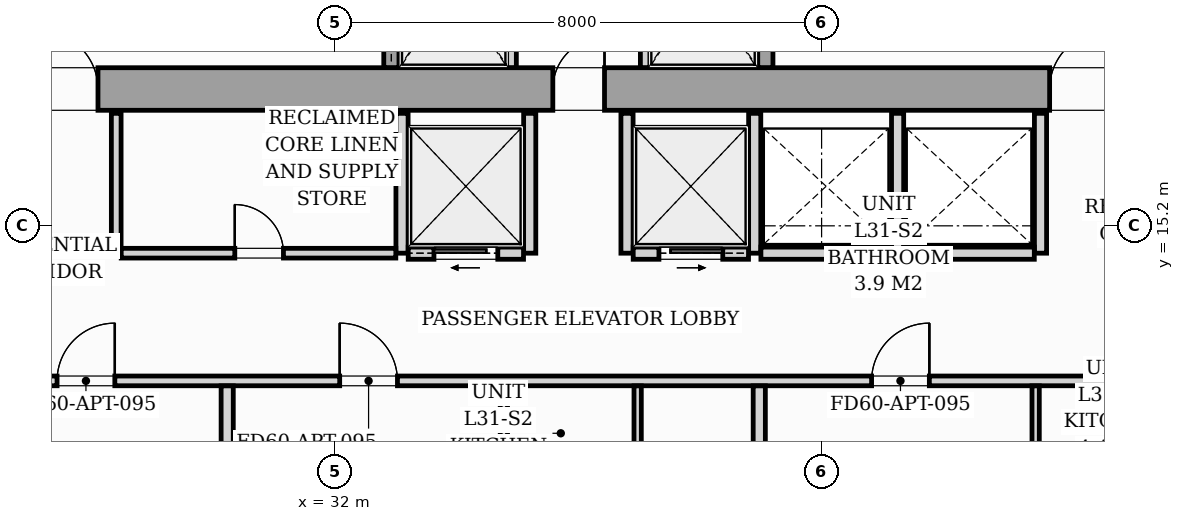
"""IFC4 building model, lengths in metres.
Left out: names, types, materials, properties, quantities, classifications, styles, units other than length and angle.
Written with IfcOpenShell. Run it as: python <this file> out.ifc"""

import sys

from ifc_helpers import new_model, si_unit, direction, frame, frame_2d, origin, origin_2d, place, context, subcontext, project, spatial, rectangle, i_section, extrude, source, transform, mapped, element, fill, save


model = new_model("IFC4")
c1 = context("Model", 3, precision=1e-05, world=origin(), true_north=direction((0.0, 1.0)))
c2 = subcontext(c1, "Body", "Model", "MODEL_VIEW")
j1 = project(units=[si_unit("LENGTHUNIT", "METRE"), si_unit("PLANEANGLEUNIT", "RADIAN")], contexts=[c1])
p1 = place(None, origin())
s1 = spatial("IfcSite", under=j1, at=p1, CompositionType="ELEMENT")
p2 = place(p1, origin())
s2 = spatial("IfcBuilding", under=s1, at=p2, CompositionType="ELEMENT")
p3 = place(p2, frame((0.0, 0.0, 109.8)))
s3 = spatial("IfcBuildingStorey", under=s2, at=p3, CompositionType="ELEMENT", Elevation=109.8)
m1 = source(origin(), c2, "Body", "SweptSolid", [
    extrude(i_section(OverallWidth=0.427, OverallDepth=0.483, WebThickness=0.051, FlangeThickness=0.082, FilletRadius=0.018, at=origin_2d()), origin(), (0.0, 0.0, 1.0), 3.196),
])
for number, where, z_axis, x_axis in (
    (1, (33.12, 17.4, 0.002), (0.0, 0.0, 1.0), (1.0, 0.0, 0.0)),
    (2, (38.88, 17.4, 0.002), (0.0, 0.0, 1.0), (1.0, 0.0, 0.0)),
):
    element("IfcColumn", number, at=place(p3, frame(where, z_axis=z_axis, x_axis=x_axis)), inside=s3, PredefinedType="PILASTER", context=c2, shape_type="MappedRepresentation", body=[
        mapped(m1, transform((0.0, 0.0, 0.0), scale=1.0)),
    ])
p4 = place(p3, frame((26.1, 17.45, 0.0), z_axis=(0.0, 0.0, 1.0), x_axis=(1.0, 0.0, 0.0)))
e3 = element("IfcWall", 3, at=p4, inside=s3, PredefinedType="SHEAR", context=c2, shape_type="SweptSolid", body=[
    extrude(rectangle(XDim=19.8, YDim=0.7, at=frame_2d((9.9, 0.0))), origin(), (0.0, 0.0, 1.0), 3.2),
])
p5 = place(p4, frame((1.05, 0.0, 0.0)))
e4 = element("IfcOpeningElement", 4, at=p5, cuts=e3, PredefinedType="OPENING", context=c2, shape_type="SweptSolid", body=[
    extrude(rectangle(XDim=0.95, YDim=2.06, at=frame_2d((0.475, 1.03))), frame((0.0, 0.36, 0.0), z_axis=(0.0, -1.0, 0.0), x_axis=(1.0, 0.0, 0.0)), (0.0, 0.0, 1.0), 0.72),
])
p6 = place(p4, frame((9.48, 0.0, 0.0)))
e5 = element("IfcOpeningElement", 5, at=p6, cuts=e3, PredefinedType="OPENING", context=c2, shape_type="SweptSolid", body=[
    extrude(rectangle(XDim=0.85, YDim=2.0, at=frame_2d((0.425, 1.0))), frame((0.0, 0.36, 0.0), z_axis=(0.0, -1.0, 0.0), x_axis=(1.0, 0.0, 0.0)), (0.0, 0.0, 1.0), 0.72),
])
p7 = place(p4, frame((17.65, 0.0, 0.0)))
e6 = element("IfcOpeningElement", 6, at=p7, cuts=e3, PredefinedType="OPENING", context=c2, shape_type="SweptSolid", body=[
    extrude(rectangle(XDim=0.95, YDim=2.06, at=frame_2d((0.475, 1.03))), frame((0.0, 0.36, 0.0), z_axis=(0.0, -1.0, 0.0), x_axis=(1.0, 0.0, 0.0)), (0.0, 0.0, 1.0), 0.72),
])
p8 = place(p3, frame((32.925, 17.802, 0.0), z_axis=(0.0, 0.0, 1.0), x_axis=(0.0, 1.0, 0.0)))
e7 = element("IfcWall", 7, at=p8, inside=s3, PredefinedType="SOLIDWALL", context=c2, shape_type="SweptSolid", body=[
    extrude(rectangle(XDim=2.646, YDim=0.25, at=frame_2d((1.323, 0.0))), origin(), (0.0, 0.0, 1.0), 3.2),
])
p9 = place(p8, frame((0.598, 0.0, 0.0)))
e8 = element("IfcOpeningElement", 8, at=p9, cuts=e7, PredefinedType="OPENING", context=c2, shape_type="SweptSolid", body=[
    extrude(rectangle(XDim=1.1, YDim=2.08, at=frame_2d((0.55, 1.04))), frame((0.0, 0.135, 0.0), z_axis=(0.0, -1.0, 0.0), x_axis=(1.0, 0.0, 0.0)), (0.0, 0.0, 1.0), 0.27),
])
for number, where, z_axis, x_axis in (
    (9, (34.9, 17.802, 0.0), (0.0, 0.0, 1.0), (0.0, 1.0, 0.0)),
    (10, (37.1, 17.802, 0.0), (0.0, 0.0, 1.0), (0.0, 1.0, 0.0)),
):
    element("IfcWall", number, at=place(p3, frame(where, z_axis=z_axis, x_axis=x_axis)), inside=s3, PredefinedType="PARTITIONING", context=c2, shape_type="SweptSolid", body=[
        extrude(rectangle(XDim=2.646, YDim=0.16, at=frame_2d((1.323, 0.0))), origin(), (0.0, 0.0, 1.0), 2.94),
    ])
p10 = place(p3, frame((39.075, 17.802, 0.0), z_axis=(0.0, 0.0, 1.0), x_axis=(0.0, 1.0, 0.0)))
e11 = element("IfcWall", 11, at=p10, inside=s3, PredefinedType="SOLIDWALL", context=c2, shape_type="SweptSolid", body=[
    extrude(rectangle(XDim=2.646, YDim=0.25, at=frame_2d((1.323, 0.0))), origin(), (0.0, 0.0, 1.0), 3.2),
])
p11 = place(p10, frame((0.598, 0.0, 0.0)))
e12 = element("IfcOpeningElement", 12, at=p11, cuts=e11, PredefinedType="OPENING", context=c2, shape_type="SweptSolid", body=[
    extrude(rectangle(XDim=1.1, YDim=2.08, at=frame_2d((0.55, 1.04))), frame((0.0, 0.135, 0.0), z_axis=(0.0, -1.0, 0.0), x_axis=(1.0, 0.0, 0.0)), (0.0, 0.0, 1.0), 0.27),
])
p12 = place(p3, frame((28.4, 14.75, 0.0), z_axis=(0.0, 0.0, 1.0), x_axis=(0.0, 1.0, 0.0)))
e13 = element("IfcWall", 13, at=p12, inside=s3, PredefinedType="PARTITIONING", context=c2, shape_type="SweptSolid", body=[
    extrude(rectangle(XDim=2.3, YDim=0.16, at=frame_2d((1.15, 0.0))), origin(), (0.0, 0.0, 1.0), 2.94),
])
p13 = place(p3, frame((33.1, 14.75, 0.0), z_axis=(0.0, 0.0, 1.0), x_axis=(0.0, 1.0, 0.0)))
e14 = element("IfcWall", 14, at=p13, inside=s3, PredefinedType="PARTITIONING", context=c2, shape_type="SweptSolid", body=[
    extrude(rectangle(XDim=2.3, YDim=0.2, at=frame_2d((1.15, 0.0))), origin(), (0.0, 0.0, 1.0), 2.94),
])
p14 = place(p3, frame((28.482, 14.75, 0.0), z_axis=(0.0, 0.0, 1.0), x_axis=(1.0, 0.0, 0.0)))
e15 = element("IfcWall", 15, at=p14, inside=s3, PredefinedType="PARTITIONING", context=c2, shape_type="SweptSolid", body=[
    extrude(rectangle(XDim=4.516, YDim=0.16, at=frame_2d((2.258, 0.0))), origin(), (0.0, 0.0, 1.0), 2.94),
])
p15 = place(p14, frame((1.868, 0.0, 0.0)))
e16 = element("IfcOpeningElement", 16, at=p15, cuts=e15, PredefinedType="OPENING", context=c2, shape_type="SweptSolid", body=[
    extrude(rectangle(XDim=0.8, YDim=2.05, at=frame_2d((0.4, 1.025))), frame((0.0, 0.09, 0.0), z_axis=(0.0, -1.0, 0.0), x_axis=(1.0, 0.0, 0.0)), (0.0, 0.0, 1.0), 0.18),
])
p16 = place(p3, frame((35.2, 14.75, 0.0), z_axis=(0.0, 0.0, 1.0), x_axis=(0.0, 1.0, 0.0)))
e17 = element("IfcWall", 17, at=p16, inside=s3, PredefinedType="PARTITIONING", context=c2, shape_type="SweptSolid", body=[
    extrude(rectangle(XDim=2.3, YDim=0.2, at=frame_2d((1.15, 0.0))), origin(), (0.0, 0.0, 1.0), 2.94),
])
p17 = place(p3, frame((33.202, 14.75, 0.0), z_axis=(0.0, 0.0, 1.0), x_axis=(1.0, 0.0, 0.0)))
e18 = element("IfcWall", 18, at=p17, inside=s3, PredefinedType="PARTITIONING", context=c2, shape_type="SweptSolid", body=[
    extrude(rectangle(XDim=1.896, YDim=0.2, at=frame_2d((0.948, 0.0))), origin(), (0.0, 0.0, 1.0), 2.94),
])
p18 = place(p17, frame((0.423, 0.0, 0.0)))
e19 = element("IfcOpeningElement", 19, at=p18, cuts=e18, PredefinedType="OPENING", context=c2, shape_type="SweptSolid", body=[
    extrude(rectangle(XDim=1.05, YDim=2.08, at=frame_2d((0.525, 1.04))), frame((0.0, 0.11, 0.0), z_axis=(0.0, -1.0, 0.0), x_axis=(1.0, 0.0, 0.0)), (0.0, 0.0, 1.0), 0.22),
])
for number, where, z_axis, x_axis in (
    (20, (36.8, 14.75, 0.0), (0.0, 0.0, 1.0), (0.0, 1.0, 0.0)),
    (21, (38.9, 14.75, 0.0), (0.0, 0.0, 1.0), (0.0, 1.0, 0.0)),
):
    element("IfcWall", number, at=place(p3, frame(where, z_axis=z_axis, x_axis=x_axis)), inside=s3, PredefinedType="PARTITIONING", context=c2, shape_type="SweptSolid", body=[
        extrude(rectangle(XDim=2.3, YDim=0.2, at=frame_2d((1.15, 0.0))), origin(), (0.0, 0.0, 1.0), 2.94),
    ])
p19 = place(p3, frame((36.902, 14.75, 0.0), z_axis=(0.0, 0.0, 1.0), x_axis=(1.0, 0.0, 0.0)))
e22 = element("IfcWall", 22, at=p19, inside=s3, PredefinedType="PARTITIONING", context=c2, shape_type="SweptSolid", body=[
    extrude(rectangle(XDim=1.896, YDim=0.2, at=frame_2d((0.948, 0.0))), origin(), (0.0, 0.0, 1.0), 2.94),
])
p20 = place(p19, frame((0.423, 0.0, 0.0)))
e23 = element("IfcOpeningElement", 23, at=p20, cuts=e22, PredefinedType="OPENING", context=c2, shape_type="SweptSolid", body=[
    extrude(rectangle(XDim=1.05, YDim=2.08, at=frame_2d((0.525, 1.04))), frame((0.0, 0.11, 0.0), z_axis=(0.0, -1.0, 0.0), x_axis=(1.0, 0.0, 0.0)), (0.0, 0.0, 1.0), 0.22),
])
for number, where, z_axis, x_axis in (
    (24, (41.25, 14.75, 0.0), (0.0, 0.0, 1.0), (0.0, 1.0, 0.0)),
    (25, (43.6, 14.75, 0.0), (0.0, 0.0, 1.0), (0.0, 1.0, 0.0)),
):
    element("IfcWall", number, at=place(p3, frame(where, z_axis=z_axis, x_axis=x_axis)), inside=s3, PredefinedType="PARTITIONING", context=c2, shape_type="SweptSolid", body=[
        extrude(rectangle(XDim=2.3, YDim=0.2, at=frame_2d((1.15, 0.0))), origin(), (0.0, 0.0, 1.0), 2.94),
    ])
for number, where, z_axis, x_axis in (
    (26, (39.002, 14.75, 0.0), (0.0, 0.0, 1.0), (1.0, 0.0, 0.0)),
    (27, (41.352, 14.75, 0.0), (0.0, 0.0, 1.0), (1.0, 0.0, 0.0)),
):
    element("IfcWall", number, at=place(p3, frame(where, z_axis=z_axis, x_axis=x_axis)), inside=s3, PredefinedType="PARTITIONING", context=c2, shape_type="SweptSolid", body=[
        extrude(rectangle(XDim=2.146, YDim=0.2, at=frame_2d((1.073, 0.0))), origin(), (0.0, 0.0, 1.0), 2.94),
    ])
p21 = place(p3, frame((21.5, 12.65, 0.0), z_axis=(0.0, 0.0, 1.0), x_axis=(1.0, 0.0, 0.0)))
e28 = element("IfcWall", 28, at=p21, inside=s3, PredefinedType="PARTITIONING", context=c2, shape_type="SweptSolid", body=[
    extrude(rectangle(XDim=26.2, YDim=0.16, at=frame_2d((13.1, 0.0))), origin(), (0.0, 0.0, 1.0), 2.94),
])
p22 = place(p21, frame((5.927, 0.0, 0.0)))
e29 = element("IfcOpeningElement", 29, at=p22, cuts=e28, PredefinedType="OPENING", context=c2, shape_type="SweptSolid", body=[
    extrude(rectangle(XDim=0.95, YDim=2.06, at=frame_2d((0.475, 1.03))), frame((0.0, 0.09, 0.0), z_axis=(0.0, -1.0, 0.0), x_axis=(1.0, 0.0, 0.0)), (0.0, 0.0, 1.0), 0.18),
])
p23 = place(p21, frame((10.575, 0.0, 0.0)))
e30 = element("IfcOpeningElement", 30, at=p23, cuts=e28, PredefinedType="OPENING", context=c2, shape_type="SweptSolid", body=[
    extrude(rectangle(XDim=0.95, YDim=2.06, at=frame_2d((0.475, 1.03))), frame((0.0, 0.09, 0.0), z_axis=(0.0, -1.0, 0.0), x_axis=(1.0, 0.0, 0.0)), (0.0, 0.0, 1.0), 0.18),
])
p24 = place(p21, frame((19.322, 0.0, 0.0)))
e31 = element("IfcOpeningElement", 31, at=p24, cuts=e28, PredefinedType="OPENING", context=c2, shape_type="SweptSolid", body=[
    extrude(rectangle(XDim=0.95, YDim=2.06, at=frame_2d((0.475, 1.03))), frame((0.0, 0.09, 0.0), z_axis=(0.0, -1.0, 0.0), x_axis=(1.0, 0.0, 0.0)), (0.0, 0.0, 1.0), 0.18),
])
p25 = place(p3, frame((30.225, 5.653, 0.0), z_axis=(0.0, 0.0, 1.0), x_axis=(0.0, 1.0, 0.0)))
e32 = element("IfcWall", 32, at=p25, inside=s3, PredefinedType="PARTITIONING", context=c2, shape_type="SweptSolid", body=[
    extrude(rectangle(XDim=6.916, YDim=0.2, at=frame_2d((3.458, 0.0))), origin(), (0.0, 0.0, 1.0), 2.94),
])
for number, where, z_axis, x_axis in (
    (33, (34.775, 10.462, 0.0), (0.0, 0.0, 1.0), (0.0, 1.0, 0.0)),
    (34, (36.975, 10.462, 0.0), (0.0, 0.0, 1.0), (0.0, 1.0, 0.0)),
):
    element("IfcWall", number, at=place(p3, frame(where, z_axis=z_axis, x_axis=x_axis)), inside=s3, PredefinedType="PARTITIONING", context=c2, shape_type="SweptSolid", body=[
        extrude(rectangle(XDim=2.106, YDim=0.12, at=frame_2d((1.053, 0.0))), origin(), (0.0, 0.0, 1.0), 2.94),
    ])
p26 = place(p3, frame((38.975, 10.462, 0.0), z_axis=(0.0, 0.0, 1.0), x_axis=(0.0, 1.0, 0.0)))
e35 = element("IfcWall", 35, at=p26, inside=s3, PredefinedType="PARTITIONING", context=c2, shape_type="SweptSolid", body=[
    extrude(rectangle(XDim=2.106, YDim=0.2, at=frame_2d((1.053, 0.0))), origin(), (0.0, 0.0, 1.0), 2.94),
])
p27 = place(p3, frame((43.52, 10.462, 0.0), z_axis=(0.0, 0.0, 1.0), x_axis=(0.0, 1.0, 0.0)))
e36 = element("IfcWall", 36, at=p27, inside=s3, PredefinedType="PARTITIONING", context=c2, shape_type="SweptSolid", body=[
    extrude(rectangle(XDim=2.106, YDim=0.12, at=frame_2d((1.053, 0.0))), origin(), (0.0, 0.0, 1.0), 2.94),
])
m2 = source(origin(), c2, "Body", "SweptSolid", [
    extrude(rectangle(XDim=0.95, YDim=2.06, at=frame_2d((0.475, 1.03))), frame((0.0, 0.025, 0.0), z_axis=(0.0, -1.0, 0.0), x_axis=(1.0, 0.0, 0.0)), (0.0, 0.0, 1.0), 0.05),
])
p28 = place(p5, origin())
e37 = element("IfcDoor", 37, at=p28, inside=s3, OperationType="SINGLE_SWING_LEFT", PredefinedType="DOOR", context=c2, shape_type="MappedRepresentation", body=[
    mapped(m2, transform((0.0, 0.0, 0.0), scale=1.0)),
])
fill(e4, e37)
m3 = source(origin(), c2, "Body", "SweptSolid", [
    extrude(rectangle(XDim=0.85, YDim=2.0, at=frame_2d((0.425, 1.0))), frame((0.0, 0.025, 0.0), z_axis=(0.0, -1.0, 0.0), x_axis=(1.0, 0.0, 0.0)), (0.0, 0.0, 1.0), 0.05),
])
p29 = place(p6, origin())
e38 = element("IfcDoor", 38, at=p29, inside=s3, OperationType="SINGLE_SWING_RIGHT", PredefinedType="DOOR", context=c2, shape_type="MappedRepresentation", body=[
    mapped(m3, transform((0.0, 0.0, 0.0), scale=1.0)),
])
fill(e5, e38)
p30 = place(p7, origin())
e39 = element("IfcDoor", 39, at=p30, inside=s3, OperationType="SINGLE_SWING_RIGHT", PredefinedType="DOOR", context=c2, shape_type="MappedRepresentation", body=[
    mapped(m2, transform((0.0, 0.0, 0.0), scale=1.0)),
])
fill(e6, e39)
m4 = source(origin(), c2, "Body", "SweptSolid", [
    extrude(rectangle(XDim=0.8, YDim=2.05, at=frame_2d((0.4, 1.025))), frame((0.0, 0.025, 0.0), z_axis=(0.0, -1.0, 0.0), x_axis=(1.0, 0.0, 0.0)), (0.0, 0.0, 1.0), 0.05),
])
p31 = place(p15, origin())
e40 = element("IfcDoor", 40, at=p31, inside=s3, OperationType="SINGLE_SWING_LEFT", PredefinedType="DOOR", context=c2, shape_type="MappedRepresentation", body=[
    mapped(m4, transform((0.0, 0.0, 0.0), scale=1.0)),
])
fill(e16, e40)
m5 = source(origin(), c2, "Body", "SweptSolid", [
    extrude(rectangle(XDim=1.05, YDim=2.08, at=frame_2d((0.525, 1.04))), frame((0.0, 0.025, 0.0), z_axis=(0.0, -1.0, 0.0), x_axis=(1.0, 0.0, 0.0)), (0.0, 0.0, 1.0), 0.05),
])
p32 = place(p18, origin())
e41 = element("IfcDoor", 41, at=p32, inside=s3, OperationType="SLIDING_TO_LEFT", PredefinedType="DOOR", context=c2, shape_type="MappedRepresentation", body=[
    mapped(m5, transform((0.0, 0.0, 0.0), scale=1.0)),
])
fill(e19, e41)
p33 = place(p20, origin())
e42 = element("IfcDoor", 42, at=p33, inside=s3, OperationType="SLIDING_TO_RIGHT", PredefinedType="DOOR", context=c2, shape_type="MappedRepresentation", body=[
    mapped(m5, transform((0.0, 0.0, 0.0), scale=1.0)),
])
fill(e23, e42)
m6 = source(origin(), c2, "Body", "SweptSolid", [
    extrude(rectangle(XDim=0.95, YDim=2.06, at=frame_2d((0.475, 1.03))), frame((0.0, 0.025, 0.0), z_axis=(0.0, -1.0, 0.0), x_axis=(1.0, 0.0, 0.0)), (0.0, 0.0, 1.0), 0.05),
])
p34 = place(p22, origin())
e43 = element("IfcDoor", 43, at=p34, inside=s3, OperationType="SINGLE_SWING_RIGHT", PredefinedType="DOOR", context=c2, shape_type="MappedRepresentation", body=[
    mapped(m6, transform((0.0, 0.0, 0.0), scale=1.0)),
])
fill(e29, e43)
p35 = place(p23, origin())
e44 = element("IfcDoor", 44, at=p35, inside=s3, OperationType="SINGLE_SWING_LEFT", PredefinedType="DOOR", context=c2, shape_type="MappedRepresentation", body=[
    mapped(m6, transform((0.0, 0.0, 0.0), scale=1.0)),
])
fill(e30, e44)
p36 = place(p24, origin())
e45 = element("IfcDoor", 45, at=p36, inside=s3, OperationType="SINGLE_SWING_RIGHT", PredefinedType="DOOR", context=c2, shape_type="MappedRepresentation", body=[
    mapped(m6, transform((0.0, 0.0, 0.0), scale=1.0)),
])
fill(e31, e45)
save(model, sys.argv[1])
